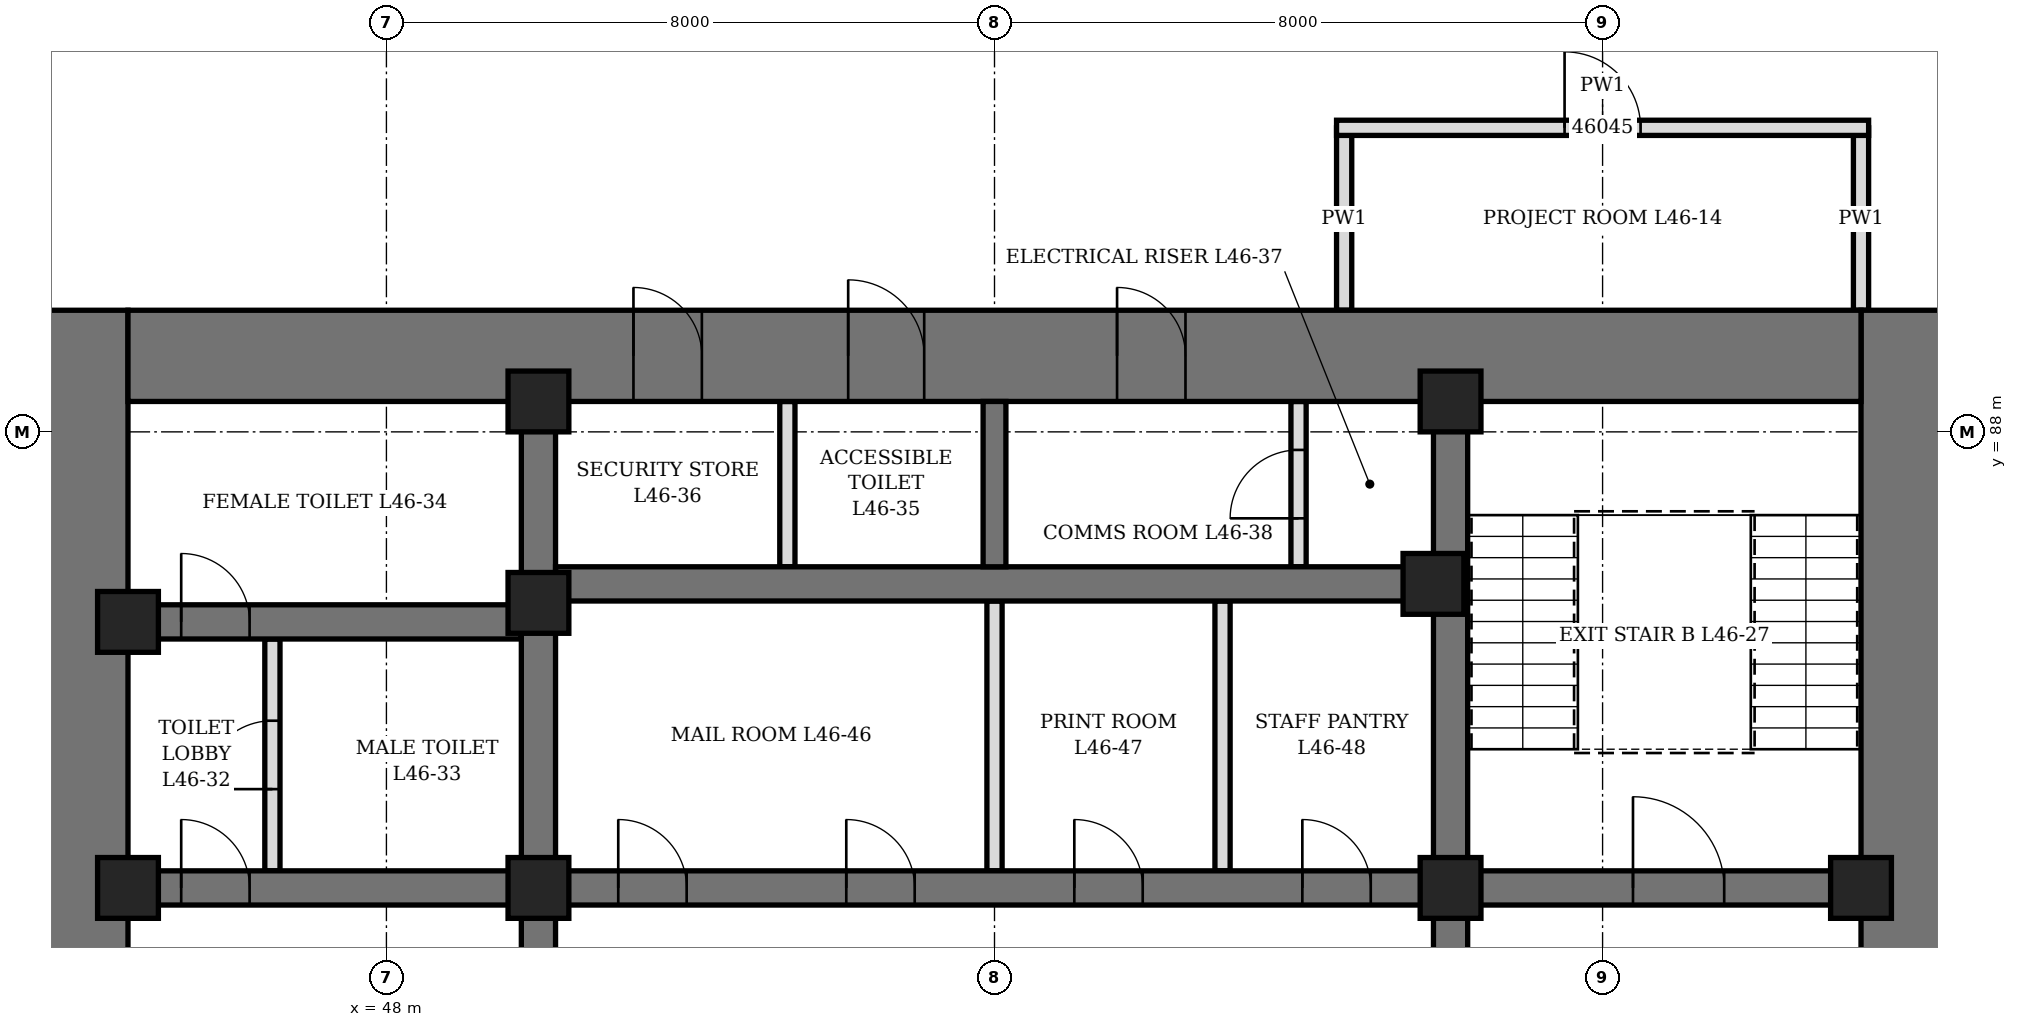
"""IFC4 building model, lengths in metres.
Left out: names, types, materials, properties, quantities, classifications, styles, units other than length and angle.
Written with IfcOpenShell. Run it as: python <this file> out.ifc"""

import sys

from ifc_helpers import new_model, si_unit, direction, frame, frame_2d, origin, origin_2d, place, context, subcontext, project, spatial, rectangle, hollow_rectangle, extrude, element, fill, save


model = new_model("IFC4")
c1 = context("Model", 3, precision=1e-05, world=origin(), true_north=direction((0.0, 1.0)))
c2 = subcontext(c1, "Body", "Model", "MODEL_VIEW")
j1 = project(units=[si_unit("LENGTHUNIT", "METRE"), si_unit("PLANEANGLEUNIT", "RADIAN")], contexts=[c1])
p1 = place(None, origin())
s1 = spatial("IfcSite", under=j1, at=p1, CompositionType="ELEMENT")
p2 = place(p1, origin())
s2 = spatial("IfcBuilding", under=s1, at=p2, CompositionType="ELEMENT")
p3 = place(p2, frame((0.0, 0.0, 206.5)))
s3 = spatial("IfcBuildingStorey", under=s2, at=p3, CompositionType="ELEMENT", Elevation=206.5)
p4 = place(p3, frame((44.0, 70.4, 0.0), z_axis=(0.0, 0.0, 1.0), x_axis=(0.0, 1.0, 0.0)))
e1 = element("IfcWall", 1, at=p4, inside=s3, PredefinedType="SHEAR", context=c2, shape_type="SweptSolid", body=[
    extrude(rectangle(XDim=19.2, YDim=1.2, at=frame_2d((9.6, 0.0))), origin(), (0.0, 0.0, 1.0), 4.2),
])
p5 = place(p4, frame((8.6, 0.0, 0.0)))
e2 = element("IfcOpeningElement", 2, at=p5, cuts=e1, PredefinedType="OPENING", context=c2, shape_type="SweptSolid", body=[
    extrude(rectangle(XDim=2.0, YDim=2.4, at=frame_2d((1.0, 1.2))), frame((0.0, 0.61, 0.0), z_axis=(0.0, -1.0, 0.0), x_axis=(1.0, 0.0, 0.0)), (0.0, 0.0, 1.0), 1.22),
])
p6 = place(p3, frame((68.0, 70.4, 0.0), z_axis=(0.0, 0.0, 1.0), x_axis=(0.0, 1.0, 0.0)))
e3 = element("IfcWall", 3, at=p6, inside=s3, PredefinedType="SHEAR", context=c2, shape_type="SweptSolid", body=[
    extrude(rectangle(XDim=19.2, YDim=1.2, at=frame_2d((9.6, 0.0))), origin(), (0.0, 0.0, 1.0), 4.2),
])
p7 = place(p6, frame((8.6, 0.0, 0.0)))
e4 = element("IfcOpeningElement", 4, at=p7, cuts=e3, PredefinedType="OPENING", context=c2, shape_type="SweptSolid", body=[
    extrude(rectangle(XDim=2.0, YDim=2.4, at=frame_2d((1.0, 1.2))), frame((0.0, 0.61, 0.0), z_axis=(0.0, -1.0, 0.0), x_axis=(1.0, 0.0, 0.0)), (0.0, 0.0, 1.0), 1.22),
])
p8 = place(p3, frame((44.6, 89.0, 0.0), z_axis=(0.0, 0.0, 1.0), x_axis=(1.0, 0.0, 0.0)))
e5 = element("IfcWall", 5, at=p8, inside=s3, PredefinedType="SHEAR", context=c2, shape_type="SweptSolid", body=[
    extrude(rectangle(XDim=22.8, YDim=1.2, at=frame_2d((11.4, 0.0))), origin(), (0.0, 0.0, 1.0), 4.2),
])
p9 = place(p8, frame((9.475, 0.0, 0.0)))
e6 = element("IfcOpeningElement", 6, at=p9, cuts=e5, PredefinedType="OPENING", context=c2, shape_type="SweptSolid", body=[
    extrude(rectangle(XDim=1.0, YDim=2.1, at=frame_2d((0.5, 1.05))), frame((0.0, 0.61, 0.0), z_axis=(0.0, -1.0, 0.0), x_axis=(1.0, 0.0, 0.0)), (0.0, 0.0, 1.0), 1.22),
])
p10 = place(p8, frame((6.65, 0.0, 0.0)))
e7 = element("IfcOpeningElement", 7, at=p10, cuts=e5, PredefinedType="OPENING", context=c2, shape_type="SweptSolid", body=[
    extrude(rectangle(XDim=0.9, YDim=2.1, at=frame_2d((0.45, 1.05))), frame((0.0, 0.61, 0.0), z_axis=(0.0, -1.0, 0.0), x_axis=(1.0, 0.0, 0.0)), (0.0, 0.0, 1.0), 1.22),
])
p11 = place(p8, frame((13.012, 0.0, 0.0)))
e8 = element("IfcOpeningElement", 8, at=p11, cuts=e5, PredefinedType="OPENING", context=c2, shape_type="SweptSolid", body=[
    extrude(rectangle(XDim=0.9, YDim=2.1, at=frame_2d((0.45, 1.05))), frame((0.0, 0.61, 0.0), z_axis=(0.0, -1.0, 0.0), x_axis=(1.0, 0.0, 0.0)), (0.0, 0.0, 1.0), 1.22),
])
p12 = place(p3, frame((50.0, 71.6, 0.0), z_axis=(0.0, 0.0, 1.0), x_axis=(0.0, 1.0, 0.0)))
e9 = element("IfcWall", 9, at=p12, inside=s3, PredefinedType="SHEAR", context=c2, shape_type="SweptSolid", body=[
    extrude(rectangle(XDim=16.8, YDim=0.45, at=frame_2d((8.4, 0.0))), origin(), (0.0, 0.0, 1.0), 4.2),
])
p13 = place(p12, frame((7.5, 0.0, 0.0)))
e10 = element("IfcOpeningElement", 10, at=p13, cuts=e9, PredefinedType="OPENING", context=c2, shape_type="SweptSolid", body=[
    extrude(rectangle(XDim=1.8, YDim=2.4, at=frame_2d((0.9, 1.2))), frame((0.0, 0.235, 0.0), z_axis=(0.0, -1.0, 0.0), x_axis=(1.0, 0.0, 0.0)), (0.0, 0.0, 1.0), 0.47),
])
p14 = place(p3, frame((62.0, 71.6, 0.0), z_axis=(0.0, 0.0, 1.0), x_axis=(0.0, 1.0, 0.0)))
e11 = element("IfcWall", 11, at=p14, inside=s3, PredefinedType="SHEAR", context=c2, shape_type="SweptSolid", body=[
    extrude(rectangle(XDim=16.8, YDim=0.45, at=frame_2d((8.4, 0.0))), origin(), (0.0, 0.0, 1.0), 4.2),
])
p15 = place(p14, frame((7.5, 0.0, 0.0)))
e12 = element("IfcOpeningElement", 12, at=p15, cuts=e11, PredefinedType="OPENING", context=c2, shape_type="SweptSolid", body=[
    extrude(rectangle(XDim=1.8, YDim=2.4, at=frame_2d((0.9, 1.2))), frame((0.0, 0.235, 0.0), z_axis=(0.0, -1.0, 0.0), x_axis=(1.0, 0.0, 0.0)), (0.0, 0.0, 1.0), 0.47),
])
p16 = place(p3, frame((44.6, 82.0, 0.0), z_axis=(0.0, 0.0, 1.0), x_axis=(1.0, 0.0, 0.0)))
e13 = element("IfcWall", 13, at=p16, inside=s3, PredefinedType="SHEAR", context=c2, shape_type="SweptSolid", body=[
    extrude(rectangle(XDim=5.175, YDim=0.45, at=frame_2d((2.587, 0.0))), origin(), (0.0, 0.0, 1.0), 4.2),
])
p17 = place(p16, frame((0.7, 0.0, 0.0)))
e14 = element("IfcOpeningElement", 14, at=p17, cuts=e13, PredefinedType="OPENING", context=c2, shape_type="SweptSolid", body=[
    extrude(rectangle(XDim=0.9, YDim=2.1, at=frame_2d((0.45, 1.05))), frame((0.0, 0.235, 0.0), z_axis=(0.0, -1.0, 0.0), x_axis=(1.0, 0.0, 0.0)), (0.0, 0.0, 1.0), 0.47),
])
p18 = place(p3, frame((44.6, 85.5, 0.0), z_axis=(0.0, 0.0, 1.0), x_axis=(1.0, 0.0, 0.0)))
e15 = element("IfcWall", 15, at=p18, inside=s3, PredefinedType="SHEAR", context=c2, shape_type="SweptSolid", body=[
    extrude(rectangle(XDim=5.175, YDim=0.45, at=frame_2d((2.587, 0.0))), origin(), (0.0, 0.0, 1.0), 4.2),
])
p19 = place(p18, frame((0.7, 0.0, 0.0)))
e16 = element("IfcOpeningElement", 16, at=p19, cuts=e15, PredefinedType="OPENING", context=c2, shape_type="SweptSolid", body=[
    extrude(rectangle(XDim=0.9, YDim=2.1, at=frame_2d((0.45, 1.05))), frame((0.0, 0.235, 0.0), z_axis=(0.0, -1.0, 0.0), x_axis=(1.0, 0.0, 0.0)), (0.0, 0.0, 1.0), 0.47),
])
p20 = place(p3, frame((62.225, 82.0, 0.0), z_axis=(0.0, 0.0, 1.0), x_axis=(1.0, 0.0, 0.0)))
e17 = element("IfcWall", 17, at=p20, inside=s3, PredefinedType="SHEAR", context=c2, shape_type="SweptSolid", body=[
    extrude(rectangle(XDim=5.175, YDim=0.45, at=frame_2d((2.587, 0.0))), origin(), (0.0, 0.0, 1.0), 4.2),
])
p21 = place(p20, frame((2.175, 0.0, 0.0)))
e18 = element("IfcOpeningElement", 18, at=p21, cuts=e17, PredefinedType="OPENING", context=c2, shape_type="SweptSolid", body=[
    extrude(rectangle(XDim=1.2, YDim=2.1, at=frame_2d((0.6, 1.05))), frame((0.0, 0.235, 0.0), z_axis=(0.0, -1.0, 0.0), x_axis=(1.0, 0.0, 0.0)), (0.0, 0.0, 1.0), 0.47),
])
p22 = place(p3, frame((50.225, 82.0, 0.0), z_axis=(0.0, 0.0, 1.0), x_axis=(1.0, 0.0, 0.0)))
e19 = element("IfcWall", 19, at=p22, inside=s3, PredefinedType="SHEAR", context=c2, shape_type="SweptSolid", body=[
    extrude(rectangle(XDim=11.55, YDim=0.45, at=frame_2d((5.775, 0.0))), origin(), (0.0, 0.0, 1.0), 4.2),
])
p23 = place(p22, frame((0.825, 0.0, 0.0)))
e20 = element("IfcOpeningElement", 20, at=p23, cuts=e19, PredefinedType="OPENING", context=c2, shape_type="SweptSolid", body=[
    extrude(rectangle(XDim=0.9, YDim=2.1, at=frame_2d((0.45, 1.05))), frame((0.0, 0.235, 0.0), z_axis=(0.0, -1.0, 0.0), x_axis=(1.0, 0.0, 0.0)), (0.0, 0.0, 1.0), 0.47),
])
p24 = place(p22, frame((3.825, 0.0, 0.0)))
e21 = element("IfcOpeningElement", 21, at=p24, cuts=e19, PredefinedType="OPENING", context=c2, shape_type="SweptSolid", body=[
    extrude(rectangle(XDim=0.9, YDim=2.1, at=frame_2d((0.45, 1.05))), frame((0.0, 0.235, 0.0), z_axis=(0.0, -1.0, 0.0), x_axis=(1.0, 0.0, 0.0)), (0.0, 0.0, 1.0), 0.47),
])
p25 = place(p22, frame((6.825, 0.0, 0.0)))
e22 = element("IfcOpeningElement", 22, at=p25, cuts=e19, PredefinedType="OPENING", context=c2, shape_type="SweptSolid", body=[
    extrude(rectangle(XDim=0.9, YDim=2.1, at=frame_2d((0.45, 1.05))), frame((0.0, 0.235, 0.0), z_axis=(0.0, -1.0, 0.0), x_axis=(1.0, 0.0, 0.0)), (0.0, 0.0, 1.0), 0.47),
])
p26 = place(p22, frame((9.825, 0.0, 0.0)))
e23 = element("IfcOpeningElement", 23, at=p26, cuts=e19, PredefinedType="OPENING", context=c2, shape_type="SweptSolid", body=[
    extrude(rectangle(XDim=0.9, YDim=2.1, at=frame_2d((0.45, 1.05))), frame((0.0, 0.235, 0.0), z_axis=(0.0, -1.0, 0.0), x_axis=(1.0, 0.0, 0.0)), (0.0, 0.0, 1.0), 0.47),
])
p27 = place(p3, frame((50.225, 86.0, 0.0), z_axis=(0.0, 0.0, 1.0), x_axis=(1.0, 0.0, 0.0)))
e24 = element("IfcWall", 24, at=p27, inside=s3, PredefinedType="SHEAR", context=c2, shape_type="SweptSolid", body=[
    extrude(rectangle(XDim=11.55, YDim=0.45, at=frame_2d((5.775, 0.0))), origin(), (0.0, 0.0, 1.0), 4.2),
])
p28 = place(p3, frame((56.0, 86.225, 0.0), z_axis=(0.0, 0.0, 1.0), x_axis=(0.0, 1.0, 0.0)))
e25 = element("IfcWall", 25, at=p28, inside=s3, PredefinedType="SHEAR", context=c2, shape_type="SweptSolid", body=[
    extrude(rectangle(XDim=2.175, YDim=0.3, at=frame_2d((1.087, 0.0))), origin(), (0.0, 0.0, 1.0), 4.2),
])
for number, where, z_axis, x_axis in (
    (26, (44.6, 82.0, 0.0), (0.0, 0.0, 1.0), (1.0, 0.0, 0.0)),
    (27, (44.6, 85.5, 0.0), (0.0, 0.0, 1.0), (1.0, 0.0, 0.0)),
    (28, (50.0, 82.0, 0.0), (0.0, 0.0, 1.0), (1.0, 0.0, 0.0)),
    (29, (50.0, 85.75, 0.0), (0.0, 0.0, 1.0), (1.0, 0.0, 0.0)),
    (30, (50.0, 88.4, 0.0), (0.0, 0.0, 1.0), (1.0, 0.0, 0.0)),
    (31, (61.775, 86.0, 0.0), (0.0, 0.0, 1.0), (1.0, 0.0, 0.0)),
    (32, (62.0, 82.0, 0.0), (0.0, 0.0, 1.0), (1.0, 0.0, 0.0)),
    (33, (62.0, 88.4, 0.0), (0.0, 0.0, 1.0), (1.0, 0.0, 0.0)),
    (34, (67.4, 82.0, 0.0), (0.0, 0.0, 1.0), (1.0, 0.0, 0.0)),
):
    element("IfcColumn", number, at=place(p3, frame(where, z_axis=z_axis, x_axis=x_axis)), inside=s3, PredefinedType="COLUMN", context=c2, shape_type="SweptSolid", body=[
        extrude(hollow_rectangle(XDim=0.8, YDim=0.8, WallThickness=0.1, at=origin_2d()), origin(), (0.0, 0.0, 1.0), 4.2),
    ])
p29 = place(p3, frame((46.5, 82.225, 0.0), z_axis=(0.0, 0.0, 1.0), x_axis=(0.0, 1.0, 0.0)))
e35 = element("IfcWall", 35, at=p29, inside=s3, PredefinedType="PARTITIONING", context=c2, shape_type="SweptSolid", body=[
    extrude(rectangle(XDim=3.05, YDim=0.2, at=frame_2d((1.525, 0.0))), origin(), (0.0, 0.0, 1.0), 4.04),
])
p30 = place(p29, frame((1.075, 0.0, 0.0)))
e36 = element("IfcOpeningElement", 36, at=p30, cuts=e35, PredefinedType="OPENING", context=c2, shape_type="SweptSolid", body=[
    extrude(rectangle(XDim=0.9, YDim=2.1, at=frame_2d((0.45, 1.05))), frame((0.0, 0.11, 0.0), z_axis=(0.0, -1.0, 0.0), x_axis=(1.0, 0.0, 0.0)), (0.0, 0.0, 1.0), 0.22),
])
p31 = place(p3, frame((53.275, 86.225, 0.0), z_axis=(0.0, 0.0, 1.0), x_axis=(0.0, 1.0, 0.0)))
e37 = element("IfcWall", 37, at=p31, inside=s3, PredefinedType="PARTITIONING", context=c2, shape_type="SweptSolid", body=[
    extrude(rectangle(XDim=2.175, YDim=0.2, at=frame_2d((1.087, 0.0))), origin(), (0.0, 0.0, 1.0), 4.04),
])
p32 = place(p3, frame((60.0, 86.225, 0.0), z_axis=(0.0, 0.0, 1.0), x_axis=(0.0, 1.0, 0.0)))
e38 = element("IfcWall", 38, at=p32, inside=s3, PredefinedType="PARTITIONING", context=c2, shape_type="SweptSolid", body=[
    extrude(rectangle(XDim=2.175, YDim=0.2, at=frame_2d((1.087, 0.0))), origin(), (0.0, 0.0, 1.0), 4.04),
])
p33 = place(p32, frame((0.637, 0.0, 0.0)))
e39 = element("IfcOpeningElement", 39, at=p33, cuts=e38, PredefinedType="OPENING", context=c2, shape_type="SweptSolid", body=[
    extrude(rectangle(XDim=0.9, YDim=2.1, at=frame_2d((0.45, 1.05))), frame((0.0, 0.11, 0.0), z_axis=(0.0, -1.0, 0.0), x_axis=(1.0, 0.0, 0.0)), (0.0, 0.0, 1.0), 0.22),
])
p34 = place(p3, frame((56.0, 82.225, 0.0), z_axis=(0.0, 0.0, 1.0), x_axis=(0.0, 1.0, 0.0)))
e40 = element("IfcWall", 40, at=p34, inside=s3, PredefinedType="PARTITIONING", context=c2, shape_type="SweptSolid", body=[
    extrude(rectangle(XDim=3.55, YDim=0.2, at=frame_2d((1.775, 0.0))), origin(), (0.0, 0.0, 1.0), 3.14),
])
p35 = place(p3, frame((59.0, 82.225, 0.0), z_axis=(0.0, 0.0, 1.0), x_axis=(0.0, 1.0, 0.0)))
e41 = element("IfcWall", 41, at=p35, inside=s3, PredefinedType="PARTITIONING", context=c2, shape_type="SweptSolid", body=[
    extrude(rectangle(XDim=3.55, YDim=0.2, at=frame_2d((1.775, 0.0))), origin(), (0.0, 0.0, 1.0), 4.04),
])
for number, where, z_axis, x_axis in (
    (42, (60.6, 89.6, 0.0), (0.0, 0.0, 1.0), (0.0, 1.0, 0.0)),
    (43, (67.4, 89.6, 0.0), (0.0, 0.0, 1.0), (0.0, 1.0, 0.0)),
):
    element("IfcWall", number, at=place(p3, frame(where, z_axis=z_axis, x_axis=x_axis)), inside=s3, PredefinedType="PARTITIONING", context=c2, shape_type="SweptSolid", body=[
        extrude(rectangle(XDim=2.4, YDim=0.2, at=frame_2d((1.2, 0.0))), origin(), (0.0, 0.0, 1.0), 4.04),
    ])
p36 = place(p3, frame((60.5, 92.0, 0.0), z_axis=(0.0, 0.0, 1.0), x_axis=(1.0, 0.0, 0.0)))
e44 = element("IfcWall", 44, at=p36, inside=s3, PredefinedType="PARTITIONING", context=c2, shape_type="SweptSolid", body=[
    extrude(rectangle(XDim=7.0, YDim=0.2, at=frame_2d((3.5, 0.0))), origin(), (0.0, 0.0, 1.0), 4.04),
])
p37 = place(p36, frame((3.0, 0.0, 0.0)))
e45 = element("IfcOpeningElement", 45, at=p37, cuts=e44, PredefinedType="OPENING", context=c2, shape_type="SweptSolid", body=[
    extrude(rectangle(XDim=1.0, YDim=2.1, at=frame_2d((0.5, 1.05))), frame((0.0, 0.11, 0.0), z_axis=(0.0, -1.0, 0.0), x_axis=(1.0, 0.0, 0.0)), (0.0, 0.0, 1.0), 0.22),
])
p38 = place(p17, origin())
e46 = element("IfcDoor", 46, at=p38, inside=s3, OperationType="SINGLE_SWING_LEFT", PredefinedType="DOOR", context=c2, shape_type="SweptSolid", body=[
    extrude(rectangle(XDim=0.9, YDim=2.1, at=frame_2d((0.45, 1.05))), frame((0.0, 0.225, 0.0), z_axis=(0.0, -1.0, 0.0), x_axis=(1.0, 0.0, 0.0)), (0.0, 0.0, 1.0), 0.449),
])
fill(e14, e46)
p39 = place(p30, origin())
e47 = element("IfcDoor", 47, at=p39, inside=s3, OperationType="SINGLE_SWING_RIGHT", PredefinedType="DOOR", context=c2, shape_type="SweptSolid", body=[
    extrude(rectangle(XDim=0.9, YDim=2.1, at=frame_2d((0.45, 1.05))), frame((0.0, 0.1, 0.0), z_axis=(0.0, -1.0, 0.0), x_axis=(1.0, 0.0, 0.0)), (0.0, 0.0, 1.0), 0.199),
])
fill(e36, e47)
p40 = place(p19, origin())
e48 = element("IfcDoor", 48, at=p40, inside=s3, OperationType="SINGLE_SWING_RIGHT", PredefinedType="DOOR", context=c2, shape_type="SweptSolid", body=[
    extrude(rectangle(XDim=0.9, YDim=2.1, at=frame_2d((0.45, 1.05))), frame((0.0, 0.225, 0.0), z_axis=(0.0, -1.0, 0.0), x_axis=(1.0, 0.0, 0.0)), (0.0, 0.0, 1.0), 0.449),
])
fill(e16, e48)
p41 = place(p9, origin())
e49 = element("IfcDoor", 49, at=p41, inside=s3, OperationType="SINGLE_SWING_LEFT", PredefinedType="DOOR", context=c2, shape_type="SweptSolid", body=[
    extrude(rectangle(XDim=1.0, YDim=2.1, at=frame_2d((0.5, 1.05))), frame((0.0, 0.35, 0.0), z_axis=(0.0, -1.0, 0.0), x_axis=(1.0, 0.0, 0.0)), (0.0, 0.0, 1.0), 0.7),
])
fill(e6, e49)
p42 = place(p10, origin())
e50 = element("IfcDoor", 50, at=p42, inside=s3, OperationType="SINGLE_SWING_LEFT", PredefinedType="DOOR", context=c2, shape_type="SweptSolid", body=[
    extrude(rectangle(XDim=0.9, YDim=2.1, at=frame_2d((0.45, 1.05))), frame((0.0, 0.35, 0.0), z_axis=(0.0, -1.0, 0.0), x_axis=(1.0, 0.0, 0.0)), (0.0, 0.0, 1.0), 0.7),
])
fill(e7, e50)
p43 = place(p11, origin())
e51 = element("IfcDoor", 51, at=p43, inside=s3, OperationType="SINGLE_SWING_LEFT", PredefinedType="DOOR", context=c2, shape_type="SweptSolid", body=[
    extrude(rectangle(XDim=0.9, YDim=2.1, at=frame_2d((0.45, 1.05))), frame((0.0, 0.35, 0.0), z_axis=(0.0, -1.0, 0.0), x_axis=(1.0, 0.0, 0.0)), (0.0, 0.0, 1.0), 0.7),
])
fill(e8, e51)
p44 = place(p33, origin())
e52 = element("IfcDoor", 52, at=p44, inside=s3, OperationType="SINGLE_SWING_LEFT", PredefinedType="DOOR", context=c2, shape_type="SweptSolid", body=[
    extrude(rectangle(XDim=0.9, YDim=2.1, at=frame_2d((0.45, 1.05))), frame((0.0, 0.1, 0.0), z_axis=(0.0, -1.0, 0.0), x_axis=(1.0, 0.0, 0.0)), (0.0, 0.0, 1.0), 0.199),
])
fill(e39, e52)
p45 = place(p23, origin())
e53 = element("IfcDoor", 53, at=p45, inside=s3, OperationType="SINGLE_SWING_LEFT", PredefinedType="DOOR", context=c2, shape_type="SweptSolid", body=[
    extrude(rectangle(XDim=0.9, YDim=2.1, at=frame_2d((0.45, 1.05))), frame((0.0, 0.225, 0.0), z_axis=(0.0, -1.0, 0.0), x_axis=(1.0, 0.0, 0.0)), (0.0, 0.0, 1.0), 0.449),
])
fill(e20, e53)
p46 = place(p24, origin())
e54 = element("IfcDoor", 54, at=p46, inside=s3, OperationType="SINGLE_SWING_LEFT", PredefinedType="DOOR", context=c2, shape_type="SweptSolid", body=[
    extrude(rectangle(XDim=0.9, YDim=2.1, at=frame_2d((0.45, 1.05))), frame((0.0, 0.225, 0.0), z_axis=(0.0, -1.0, 0.0), x_axis=(1.0, 0.0, 0.0)), (0.0, 0.0, 1.0), 0.449),
])
fill(e21, e54)
p47 = place(p25, origin())
e55 = element("IfcDoor", 55, at=p47, inside=s3, OperationType="SINGLE_SWING_LEFT", PredefinedType="DOOR", context=c2, shape_type="SweptSolid", body=[
    extrude(rectangle(XDim=0.9, YDim=2.1, at=frame_2d((0.45, 1.05))), frame((0.0, 0.225, 0.0), z_axis=(0.0, -1.0, 0.0), x_axis=(1.0, 0.0, 0.0)), (0.0, 0.0, 1.0), 0.449),
])
fill(e22, e55)
p48 = place(p26, origin())
e56 = element("IfcDoor", 56, at=p48, inside=s3, OperationType="SINGLE_SWING_LEFT", PredefinedType="DOOR", context=c2, shape_type="SweptSolid", body=[
    extrude(rectangle(XDim=0.9, YDim=2.1, at=frame_2d((0.45, 1.05))), frame((0.0, 0.225, 0.0), z_axis=(0.0, -1.0, 0.0), x_axis=(1.0, 0.0, 0.0)), (0.0, 0.0, 1.0), 0.449),
])
fill(e23, e56)
p49 = place(p21, origin())
e57 = element("IfcDoor", 57, at=p49, inside=s3, OperationType="SINGLE_SWING_LEFT", PredefinedType="DOOR", context=c2, shape_type="SweptSolid", body=[
    extrude(rectangle(XDim=1.2, YDim=2.1, at=frame_2d((0.6, 1.05))), frame((0.0, 0.225, 0.0), z_axis=(0.0, -1.0, 0.0), x_axis=(1.0, 0.0, 0.0)), (0.0, 0.0, 1.0), 0.449),
])
fill(e18, e57)
p50 = place(p37, origin())
e58 = element("IfcDoor", 58, at=p50, inside=s3, OperationType="SINGLE_SWING_LEFT", PredefinedType="DOOR", context=c2, shape_type="SweptSolid", body=[
    extrude(rectangle(XDim=1.0, YDim=2.1, at=frame_2d((0.5, 1.05))), frame((0.0, 0.1, 0.0), z_axis=(0.0, -1.0, 0.0), x_axis=(1.0, 0.0, 0.0)), (0.0, 0.0, 1.0), 0.199),
])
fill(e45, e58)
save(model, sys.argv[1])
